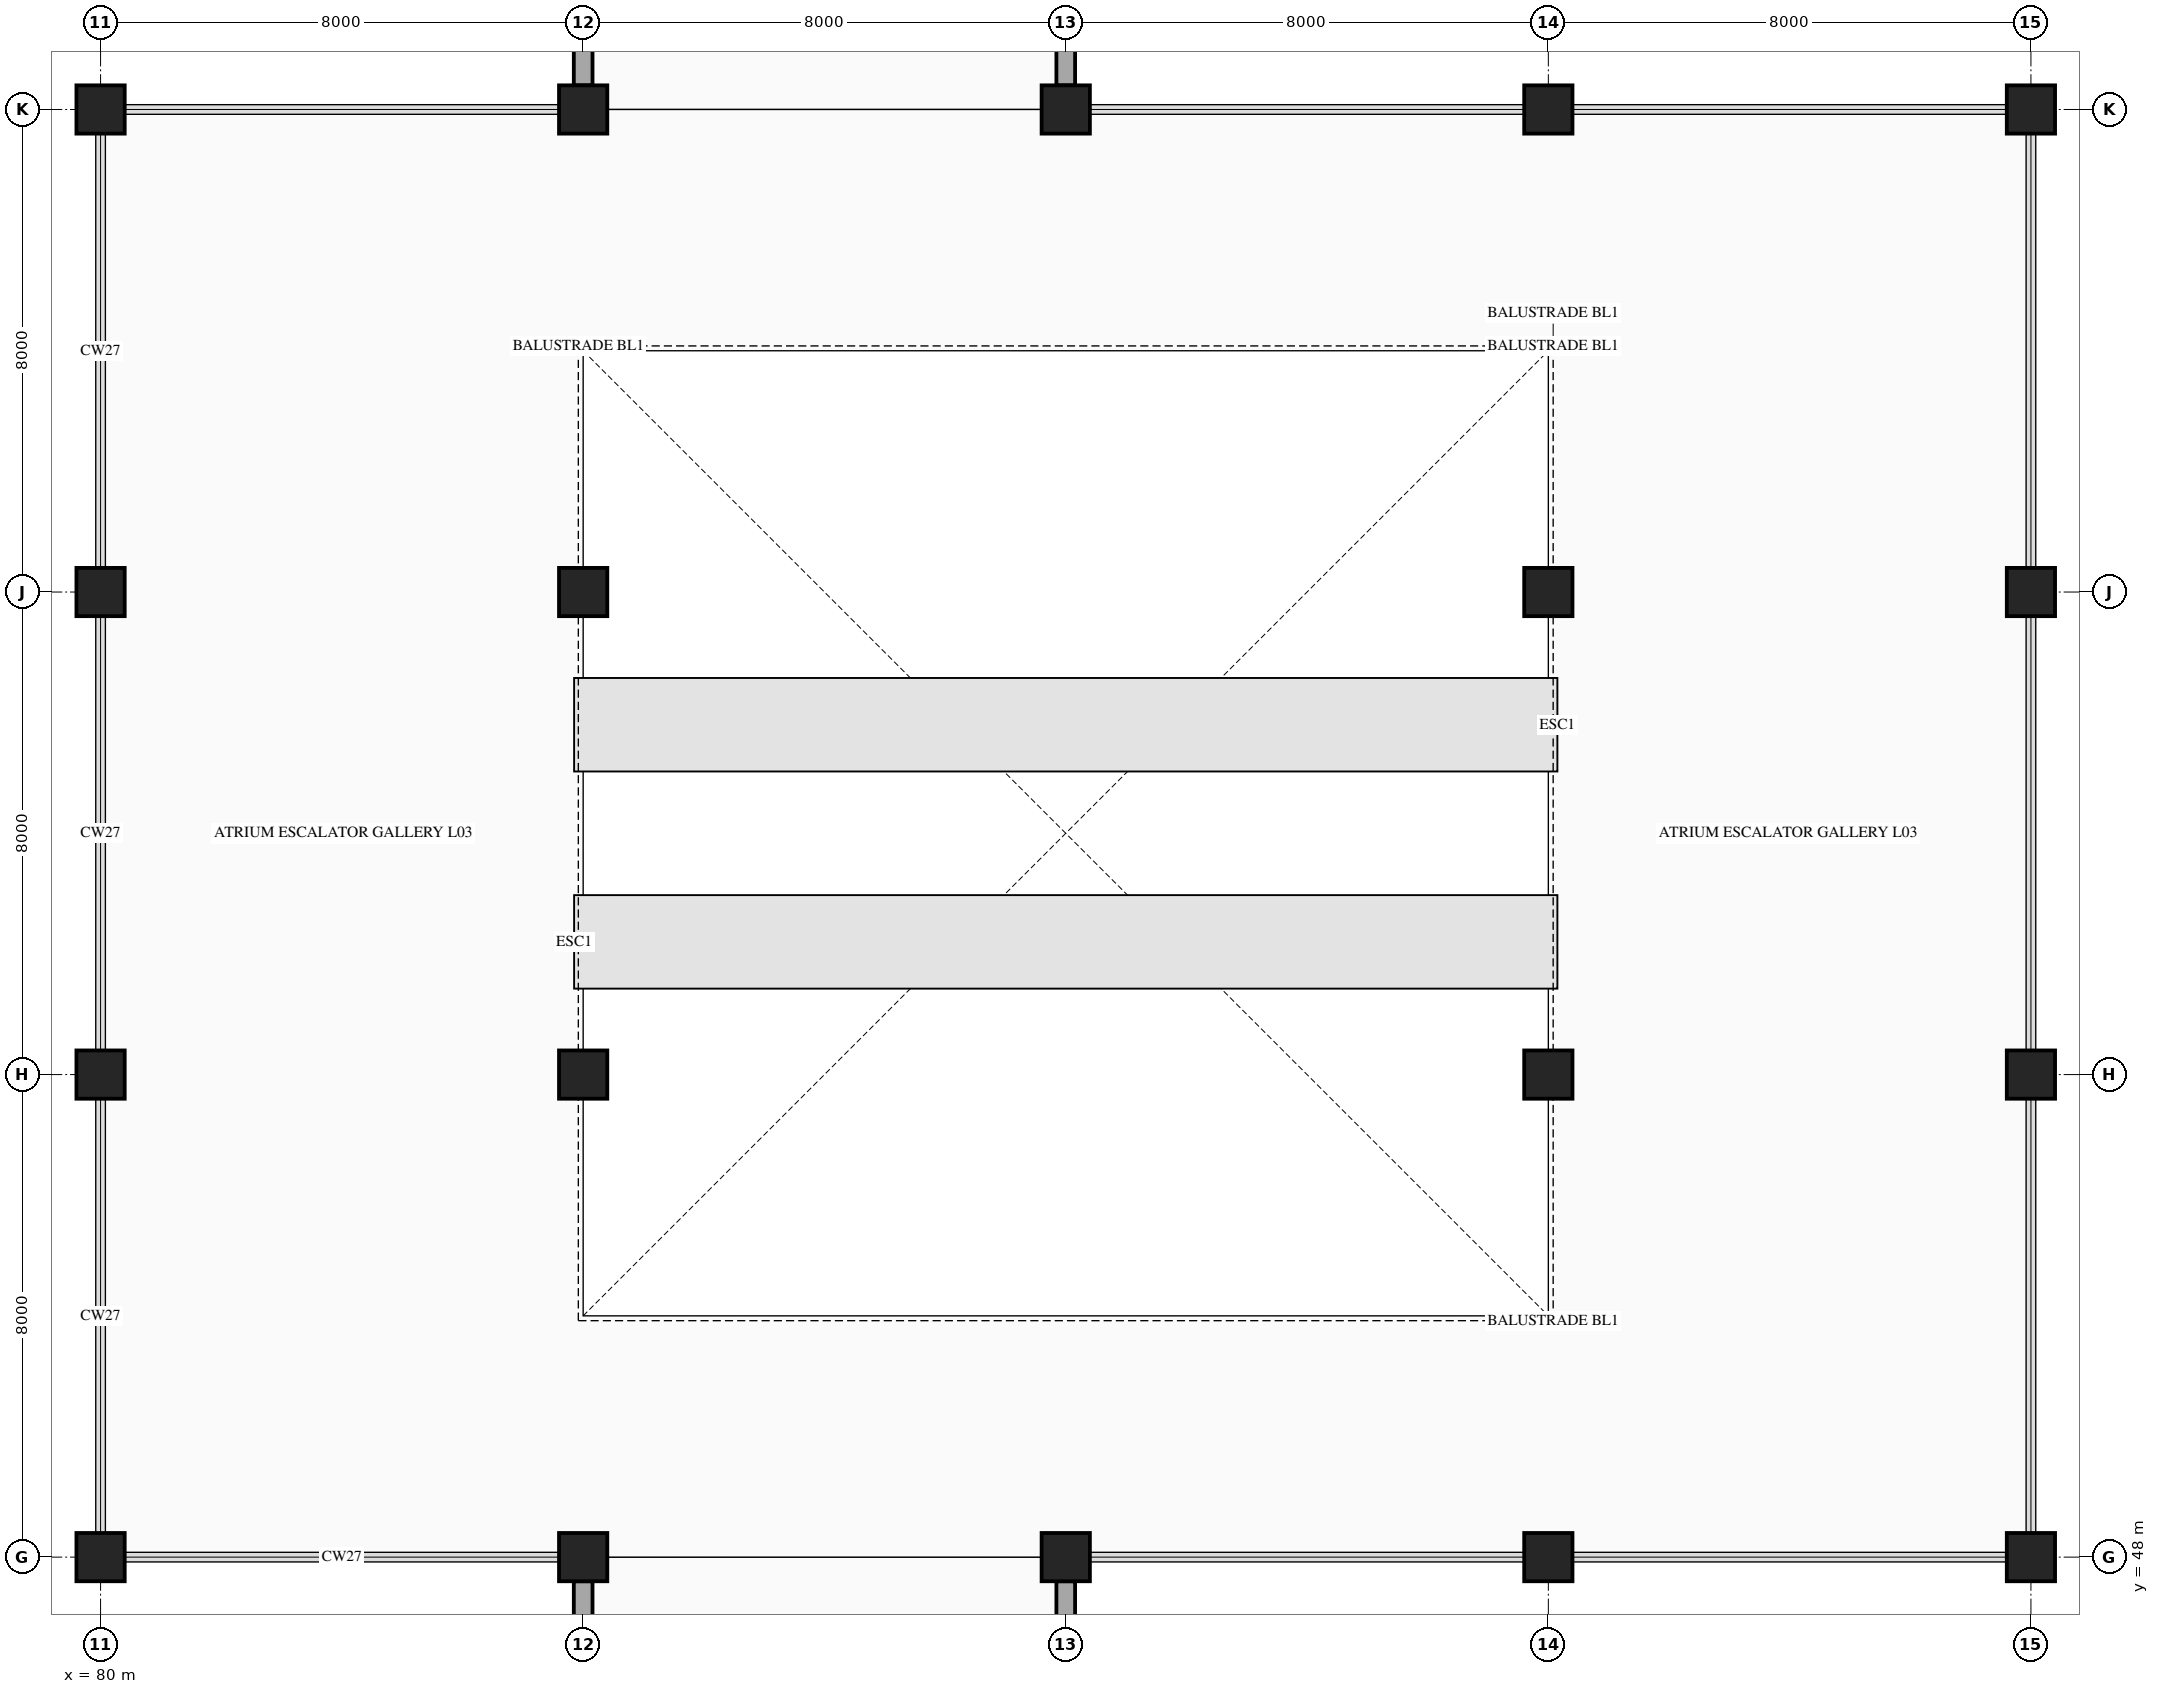
"""IFC4 building model, lengths in metres.
Left out: names, types, materials, properties, quantities, classifications, styles, units other than length and angle.
Written with IfcOpenShell. Run it as: python <this file> out.ifc"""

import sys

from ifc_helpers import new_model, si_unit, direction, frame, frame_2d, origin, origin_2d, place, context, subcontext, project, spatial, rectangle, circle, extrude, element, save


model = new_model("IFC4")
c1 = context("Model", 3, precision=1e-05, world=origin(), true_north=direction((0.0, 1.0)))
c2 = subcontext(c1, "Body", "Model", "MODEL_VIEW")
j1 = project(units=[si_unit("LENGTHUNIT", "METRE"), si_unit("PLANEANGLEUNIT", "RADIAN")], contexts=[c1])
p1 = place(None, origin())
s1 = spatial("IfcSite", under=j1, at=p1, CompositionType="ELEMENT")
p2 = place(p1, origin())
s2 = spatial("IfcBuilding", under=s1, at=p2, CompositionType="ELEMENT")
p3 = place(p2, frame((0.0, 0.0, 14.9)))
s3 = spatial("IfcBuildingStorey", under=s2, at=p3, CompositionType="ELEMENT", Elevation=14.9)
p4 = place(p3, frame((80.0, 48.0, 0.0), z_axis=(0.0, 0.0, 1.0), x_axis=(1.0, 0.0, 0.0)))
e1 = element("IfcColumn", 1, at=p4, inside=s3, PredefinedType="COLUMN", context=c2, shape_type="SweptSolid", body=[
    extrude(circle(Radius=0.4, at=origin_2d()), origin(), (0.0, 0.0, 1.0), 4.5),
])
p5 = place(p3, frame((80.0, 56.0, 0.0), z_axis=(0.0, 0.0, 1.0), x_axis=(1.0, 0.0, 0.0)))
e2 = element("IfcColumn", 2, at=p5, inside=s3, PredefinedType="COLUMN", context=c2, shape_type="SweptSolid", body=[
    extrude(rectangle(XDim=0.8, YDim=0.8, at=origin_2d()), origin(), (0.0, 0.0, 1.0), 4.5),
])
p6 = place(p3, frame((80.0, 64.0, 0.0), z_axis=(0.0, 0.0, 1.0), x_axis=(1.0, 0.0, 0.0)))
e3 = element("IfcColumn", 3, at=p6, inside=s3, PredefinedType="COLUMN", context=c2, shape_type="SweptSolid", body=[
    extrude(circle(Radius=0.4, at=origin_2d()), origin(), (0.0, 0.0, 1.0), 4.5),
])
for number, where, z_axis, x_axis in (
    (4, (80.0, 72.0, 0.0), (0.0, 0.0, 1.0), (1.0, 0.0, 0.0)),
    (5, (88.0, 48.0, 0.0), (0.0, 0.0, 1.0), (1.0, 0.0, 0.0)),
):
    element("IfcColumn", number, at=place(p3, frame(where, z_axis=z_axis, x_axis=x_axis)), inside=s3, PredefinedType="COLUMN", context=c2, shape_type="SweptSolid", body=[
        extrude(rectangle(XDim=0.8, YDim=0.8, at=origin_2d()), origin(), (0.0, 0.0, 1.0), 4.5),
    ])
p7 = place(p3, frame((88.0, 56.0, 0.0), z_axis=(0.0, 0.0, 1.0), x_axis=(1.0, 0.0, 0.0)))
e6 = element("IfcColumn", 6, at=p7, inside=s3, PredefinedType="COLUMN", context=c2, shape_type="SweptSolid", body=[
    extrude(circle(Radius=0.4, at=origin_2d()), origin(), (0.0, 0.0, 1.0), 4.5),
])
p8 = place(p3, frame((88.0, 64.0, 0.0), z_axis=(0.0, 0.0, 1.0), x_axis=(1.0, 0.0, 0.0)))
e7 = element("IfcColumn", 7, at=p8, inside=s3, PredefinedType="COLUMN", context=c2, shape_type="SweptSolid", body=[
    extrude(rectangle(XDim=0.8, YDim=0.8, at=origin_2d()), origin(), (0.0, 0.0, 1.0), 4.5),
])
for number, where, z_axis, x_axis in (
    (8, (88.0, 72.0, 0.0), (0.0, 0.0, 1.0), (1.0, 0.0, 0.0)),
    (9, (96.0, 48.0, 0.0), (0.0, 0.0, 1.0), (1.0, 0.0, 0.0)),
):
    element("IfcColumn", number, at=place(p3, frame(where, z_axis=z_axis, x_axis=x_axis)), inside=s3, PredefinedType="COLUMN", context=c2, shape_type="SweptSolid", body=[
        extrude(circle(Radius=0.4, at=origin_2d()), origin(), (0.0, 0.0, 1.0), 4.5),
    ])
for number, where, z_axis, x_axis in (
    (10, (96.0, 72.0, 0.0), (0.0, 0.0, 1.0), (1.0, 0.0, 0.0)),
    (11, (104.0, 48.0, 0.0), (0.0, 0.0, 1.0), (1.0, 0.0, 0.0)),
):
    element("IfcColumn", number, at=place(p3, frame(where, z_axis=z_axis, x_axis=x_axis)), inside=s3, PredefinedType="COLUMN", context=c2, shape_type="SweptSolid", body=[
        extrude(rectangle(XDim=0.8, YDim=0.8, at=origin_2d()), origin(), (0.0, 0.0, 1.0), 4.5),
    ])
p9 = place(p3, frame((104.0, 56.0, 0.0), z_axis=(0.0, 0.0, 1.0), x_axis=(1.0, 0.0, 0.0)))
e12 = element("IfcColumn", 12, at=p9, inside=s3, PredefinedType="COLUMN", context=c2, shape_type="SweptSolid", body=[
    extrude(circle(Radius=0.4, at=origin_2d()), origin(), (0.0, 0.0, 1.0), 4.5),
])
p10 = place(p3, frame((104.0, 64.0, 0.0), z_axis=(0.0, 0.0, 1.0), x_axis=(1.0, 0.0, 0.0)))
e13 = element("IfcColumn", 13, at=p10, inside=s3, PredefinedType="COLUMN", context=c2, shape_type="SweptSolid", body=[
    extrude(rectangle(XDim=0.8, YDim=0.8, at=origin_2d()), origin(), (0.0, 0.0, 1.0), 4.5),
])
for number, where, z_axis, x_axis in (
    (14, (104.0, 72.0, 0.0), (0.0, 0.0, 1.0), (1.0, 0.0, 0.0)),
    (15, (112.0, 48.0, 0.0), (0.0, 0.0, 1.0), (1.0, 0.0, 0.0)),
):
    element("IfcColumn", number, at=place(p3, frame(where, z_axis=z_axis, x_axis=x_axis)), inside=s3, PredefinedType="COLUMN", context=c2, shape_type="SweptSolid", body=[
        extrude(circle(Radius=0.4, at=origin_2d()), origin(), (0.0, 0.0, 1.0), 4.5),
    ])
p11 = place(p3, frame((112.0, 56.0, 0.0), z_axis=(0.0, 0.0, 1.0), x_axis=(1.0, 0.0, 0.0)))
e16 = element("IfcColumn", 16, at=p11, inside=s3, PredefinedType="COLUMN", context=c2, shape_type="SweptSolid", body=[
    extrude(rectangle(XDim=0.8, YDim=0.8, at=origin_2d()), origin(), (0.0, 0.0, 1.0), 4.5),
])
p12 = place(p3, frame((112.0, 64.0, 0.0), z_axis=(0.0, 0.0, 1.0), x_axis=(1.0, 0.0, 0.0)))
e17 = element("IfcColumn", 17, at=p12, inside=s3, PredefinedType="COLUMN", context=c2, shape_type="SweptSolid", body=[
    extrude(circle(Radius=0.4, at=origin_2d()), origin(), (0.0, 0.0, 1.0), 4.5),
])
p13 = place(p3, frame((112.0, 72.0, 0.0), z_axis=(0.0, 0.0, 1.0), x_axis=(1.0, 0.0, 0.0)))
e18 = element("IfcColumn", 18, at=p13, inside=s3, PredefinedType="COLUMN", context=c2, shape_type="SweptSolid", body=[
    extrude(rectangle(XDim=0.8, YDim=0.8, at=origin_2d()), origin(), (0.0, 0.0, 1.0), 4.5),
])
p14 = place(p3, frame((88.0, 40.375, 0.0), z_axis=(0.0, 0.0, 1.0), x_axis=(0.0, 1.0, 0.0)))
e19 = element("IfcWall", 19, at=p14, inside=s3, PredefinedType="STANDARD", context=c2, shape_type="SweptSolid", body=[
    extrude(rectangle(XDim=7.225, YDim=0.31, at=frame_2d((3.613, 0.0))), origin(), (0.0, 0.0, 1.0), 3.48),
])
p15 = place(p14, frame((2.513, 0.0, 0.8)))
e20 = element("IfcOpeningElement", 20, at=p15, cuts=e19, PredefinedType="OPENING", context=c2, shape_type="SweptSolid", body=[
    extrude(rectangle(XDim=2.2, YDim=2.05, at=frame_2d((1.1, 1.025))), frame((0.0, 0.165, 0.0), z_axis=(0.0, -1.0, 0.0), x_axis=(1.0, 0.0, 0.0)), (0.0, 0.0, 1.0), 0.33),
])
p16 = place(p3, frame((88.0, 72.4, 0.0), z_axis=(0.0, 0.0, 1.0), x_axis=(0.0, 1.0, 0.0)))
e21 = element("IfcWall", 21, at=p16, inside=s3, PredefinedType="STANDARD", context=c2, shape_type="SweptSolid", body=[
    extrude(rectangle(XDim=7.275, YDim=0.31, at=frame_2d((3.638, 0.0))), origin(), (0.0, 0.0, 1.0), 3.48),
])
p17 = place(p16, frame((2.537, 0.0, 0.8)))
e22 = element("IfcOpeningElement", 22, at=p17, cuts=e21, PredefinedType="OPENING", context=c2, shape_type="SweptSolid", body=[
    extrude(rectangle(XDim=2.2, YDim=2.05, at=frame_2d((1.1, 1.025))), frame((0.0, 0.165, 0.0), z_axis=(0.0, -1.0, 0.0), x_axis=(1.0, 0.0, 0.0)), (0.0, 0.0, 1.0), 0.33),
])
p18 = place(p3, frame((96.0, 79.675, 0.0), z_axis=(0.0, 0.0, 1.0), x_axis=(0.0, -1.0, 0.0)))
e23 = element("IfcWall", 23, at=p18, inside=s3, PredefinedType="STANDARD", context=c2, shape_type="SweptSolid", body=[
    extrude(rectangle(XDim=7.275, YDim=0.31, at=frame_2d((3.638, 0.0))), origin(), (0.0, 0.0, 1.0), 3.48),
])
p19 = place(p18, frame((2.537, 0.0, 0.8)))
e24 = element("IfcOpeningElement", 24, at=p19, cuts=e23, PredefinedType="OPENING", context=c2, shape_type="SweptSolid", body=[
    extrude(rectangle(XDim=2.2, YDim=2.05, at=frame_2d((1.1, 1.025))), frame((0.0, 0.165, 0.0), z_axis=(0.0, -1.0, 0.0), x_axis=(1.0, 0.0, 0.0)), (0.0, 0.0, 1.0), 0.33),
])
p20 = place(p3, frame((96.0, 47.6, 0.0), z_axis=(0.0, 0.0, 1.0), x_axis=(0.0, -1.0, 0.0)))
e25 = element("IfcWall", 25, at=p20, inside=s3, PredefinedType="STANDARD", context=c2, shape_type="SweptSolid", body=[
    extrude(rectangle(XDim=7.225, YDim=0.31, at=frame_2d((3.613, 0.0))), origin(), (0.0, 0.0, 1.0), 3.48),
])
p21 = place(p20, frame((2.513, 0.0, 0.8)))
e26 = element("IfcOpeningElement", 26, at=p21, cuts=e25, PredefinedType="OPENING", context=c2, shape_type="SweptSolid", body=[
    extrude(rectangle(XDim=2.2, YDim=2.05, at=frame_2d((1.1, 1.025))), frame((0.0, 0.165, 0.0), z_axis=(0.0, -1.0, 0.0), x_axis=(1.0, 0.0, 0.0)), (0.0, 0.0, 1.0), 0.33),
])
save(model, sys.argv[1])
